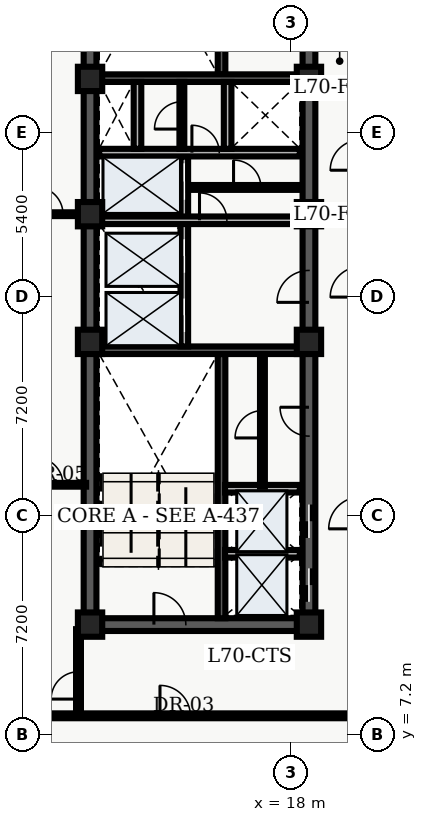
"""IFC4 building model, lengths in metres.
Left out: names, types, materials, properties, quantities, classifications, styles, units other than length and angle.
Written with IfcOpenShell. Run it as: python <this file> out.ifc"""

import sys

from ifc_helpers import new_model, entity, si_unit, converted_unit, direction, frame, origin_with_axes, origin_2d_with_axis, place, context, subcontext, project, spatial, polyline, rectangle, outline, extrude, element, fill, save


model = new_model("IFC4")
c1 = context("Model", 3, precision=1e-05, world=origin_with_axes(), true_north=direction((0.0, 1.0)))
c2 = subcontext(c1, "Body", "Model", "MODEL_VIEW")
j1 = project(units=[si_unit("LENGTHUNIT", "METRE"), converted_unit("PLANEANGLEUNIT", "DEGREE", entity("IfcPlaneAngleMeasure", 0.017), si_unit("PLANEANGLEUNIT", "RADIAN"), dimensions=[0, 0, 0, 0, 0, 0, 0])], contexts=[c1])
p1 = place(None, origin_with_axes())
s1 = spatial("IfcSite", under=j1, at=p1, CompositionType="ELEMENT")
p2 = place(p1, origin_with_axes())
s2 = spatial("IfcBuilding", under=s1, at=p2, CompositionType="ELEMENT")
p3 = place(p2, frame((0.0, 0.0, 284.1), z_axis=(0.0, 0.0, 1.0), x_axis=(1.0, 0.0, 0.0)))
s3 = spatial("IfcBuildingStorey", under=s2, at=p3, CompositionType="ELEMENT", Elevation=284.1)
p4 = place(p3, frame((11.4, 10.8, 0.0), z_axis=(0.0, 0.0, 1.0), x_axis=(0.0, 1.0, 0.0)))
e1 = element("IfcWall", 1, at=p4, inside=s3, PredefinedType="SHEAR", context=c2, shape_type="SweptSolid", body=[
    extrude(outline(polyline([(0.0, -0.21), (27.0, -0.21), (27.0, 0.21), (0.0, 0.21), (0.0, -0.21)])), origin_with_axes(), (0.0, 0.0, 1.0), 3.6),
])
p5 = place(p3, frame((11.4, 10.8, 0.0), z_axis=(0.0, 0.0, 1.0), x_axis=(1.0, 0.0, 0.0)))
e2 = element("IfcWall", 2, at=p5, inside=s3, PredefinedType="SHEAR", context=c2, shape_type="SweptSolid", body=[
    extrude(outline(polyline([(0.0, -0.21), (7.2, -0.21), (7.2, 0.21), (0.0, 0.21), (0.0, -0.21)])), origin_with_axes(), (0.0, 0.0, 1.0), 3.6),
])
p6 = place(p5, frame((2.625, 0.0, 0.0), z_axis=(0.0, 0.0, 1.0), x_axis=(1.0, 0.0, 0.0)))
e3 = element("IfcOpeningElement", 3, at=p6, cuts=e2, PredefinedType="OPENING", context=c2, shape_type="SweptSolid", body=[
    extrude(rectangle(XDim=1.05, YDim=0.44, at=origin_2d_with_axis()), origin_with_axes(), (0.0, 0.0, 1.0), 2.15),
])
p7 = place(p3, frame((18.6, 10.8, 0.0), z_axis=(0.0, 0.0, 1.0), x_axis=(0.0, 1.0, 0.0)))
e4 = element("IfcWall", 4, at=p7, inside=s3, PredefinedType="SHEAR", context=c2, shape_type="SweptSolid", body=[
    extrude(outline(polyline([(0.0, -0.21), (13.5, -0.21), (13.5, 0.21), (0.0, 0.21), (0.0, -0.21)])), origin_with_axes(), (0.0, 0.0, 1.0), 3.6),
])
p8 = place(p7, frame((1.3, 0.0, 0.0), z_axis=(0.0, 0.0, 1.0), x_axis=(1.0, 0.0, 0.0)))
e5 = element("IfcOpeningElement", 5, at=p8, cuts=e4, PredefinedType="OPENING", context=c2, shape_type="SweptSolid", body=[
    extrude(rectangle(XDim=1.1, YDim=0.44, at=origin_2d_with_axis()), origin_with_axes(), (0.0, 0.0, 1.0), 2.15),
])
p9 = place(p7, frame((3.4, 0.0, 0.0), z_axis=(0.0, 0.0, 1.0), x_axis=(1.0, 0.0, 0.0)))
e6 = element("IfcOpeningElement", 6, at=p9, cuts=e4, PredefinedType="OPENING", context=c2, shape_type="SweptSolid", body=[
    extrude(rectangle(XDim=1.1, YDim=0.44, at=origin_2d_with_axis()), origin_with_axes(), (0.0, 0.0, 1.0), 2.15),
])
p10 = place(p7, frame((11.125, 0.0, 0.0), z_axis=(0.0, 0.0, 1.0), x_axis=(1.0, 0.0, 0.0)))
e7 = element("IfcOpeningElement", 7, at=p10, cuts=e4, PredefinedType="OPENING", context=c2, shape_type="SweptSolid", body=[
    extrude(rectangle(XDim=1.05, YDim=0.44, at=origin_2d_with_axis()), origin_with_axes(), (0.0, 0.0, 1.0), 2.15),
])
p11 = place(p7, frame((6.675, 0.0, 0.0), z_axis=(0.0, 0.0, 1.0), x_axis=(1.0, 0.0, 0.0)))
e8 = element("IfcOpeningElement", 8, at=p11, cuts=e4, PredefinedType="OPENING", context=c2, shape_type="SweptSolid", body=[
    extrude(rectangle(XDim=0.95, YDim=0.44, at=origin_2d_with_axis()), origin_with_axes(), (0.0, 0.0, 1.0), 2.15),
])
p12 = place(p3, frame((18.6, 24.3, 0.0), z_axis=(0.0, 0.0, 1.0), x_axis=(0.0, 1.0, 0.0)))
e9 = element("IfcWall", 9, at=p12, inside=s3, PredefinedType="SHEAR", context=c2, shape_type="SweptSolid", body=[
    extrude(outline(polyline([(0.0, -0.21), (13.5, -0.21), (13.5, 0.21), (0.0, 0.21), (0.0, -0.21)])), origin_with_axes(), (0.0, 0.0, 1.0), 3.6),
])
p13 = place(p12, frame((6.725, 0.0, 0.0), z_axis=(0.0, 0.0, 1.0), x_axis=(1.0, 0.0, 0.0)))
e10 = element("IfcOpeningElement", 10, at=p13, cuts=e9, PredefinedType="OPENING", context=c2, shape_type="SweptSolid", body=[
    extrude(rectangle(XDim=1.05, YDim=0.44, at=origin_2d_with_axis()), origin_with_axes(), (0.0, 0.0, 1.0), 2.15),
])
p14 = place(p12, frame((11.125, 0.0, 0.0), z_axis=(0.0, 0.0, 1.0), x_axis=(1.0, 0.0, 0.0)))
e11 = element("IfcOpeningElement", 11, at=p14, cuts=e9, PredefinedType="OPENING", context=c2, shape_type="SweptSolid", body=[
    extrude(rectangle(XDim=1.05, YDim=0.44, at=origin_2d_with_axis()), origin_with_axes(), (0.0, 0.0, 1.0), 2.15),
])
p15 = place(p3, frame((15.725, 11.01, 0.0), z_axis=(0.0, 0.0, 1.0), x_axis=(0.0, 1.0, 0.0)))
e12 = element("IfcWall", 12, at=p15, inside=s3, PredefinedType="SHEAR", context=c2, shape_type="SweptSolid", body=[
    extrude(outline(polyline([(0.0, -0.125), (8.69, -0.125), (8.69, 0.125), (0.0, 0.125), (0.0, -0.125)])), origin_with_axes(), (0.0, 0.0, 1.0), 3.6),
])
p16 = place(p3, frame((11.61, 19.825, 0.0), z_axis=(0.0, 0.0, 1.0), x_axis=(1.0, 0.0, 0.0)))
e13 = element("IfcWall", 13, at=p16, inside=s3, PredefinedType="SHEAR", context=c2, shape_type="SweptSolid", body=[
    extrude(outline(polyline([(0.0, -0.125), (6.78, -0.125), (6.78, 0.125), (0.0, 0.125), (0.0, -0.125)])), origin_with_axes(), (0.0, 0.0, 1.0), 3.6),
])
p17 = place(p3, frame((15.725, 28.9, 0.0), z_axis=(0.0, 0.0, 1.0), x_axis=(0.0, 1.0, 0.0)))
e14 = element("IfcWall", 14, at=p17, inside=s3, PredefinedType="SHEAR", context=c2, shape_type="SweptSolid", body=[
    extrude(outline(polyline([(0.0, -0.125), (8.69, -0.125), (8.69, 0.125), (0.0, 0.125), (0.0, -0.125)])), origin_with_axes(), (0.0, 0.0, 1.0), 3.6),
])
p18 = place(p3, frame((11.61, 28.775, 0.0), z_axis=(0.0, 0.0, 1.0), x_axis=(1.0, 0.0, 0.0)))
e15 = element("IfcWall", 15, at=p18, inside=s3, PredefinedType="SHEAR", context=c2, shape_type="SweptSolid", body=[
    extrude(outline(polyline([(0.0, -0.125), (6.78, -0.125), (6.78, 0.125), (0.0, 0.125), (0.0, -0.125)])), origin_with_axes(), (0.0, 0.0, 1.0), 3.6),
])
p19 = place(p3, frame((14.5, 19.95, 0.0), z_axis=(0.0, 0.0, 1.0), x_axis=(0.0, 1.0, 0.0)))
e16 = element("IfcWall", 16, at=p19, inside=s3, PredefinedType="SOLIDWALL", context=c2, shape_type="SweptSolid", body=[
    extrude(outline(polyline([(0.0, -0.125), (6.25, -0.125), (6.25, 0.125), (0.0, 0.125), (0.0, -0.125)])), origin_with_axes(), (0.0, 0.0, 1.0), 2.64),
])
p20 = place(p19, frame((1.025, 0.0, 0.0), z_axis=(0.0, 0.0, 1.0), x_axis=(1.0, 0.0, 0.0)))
e17 = element("IfcOpeningElement", 17, at=p20, cuts=e16, PredefinedType="OPENING", context=c2, shape_type="SweptSolid", body=[
    extrude(rectangle(XDim=1.1, YDim=0.27, at=origin_2d_with_axis()), origin_with_axes(), (0.0, 0.0, 1.0), 2.15),
])
p21 = place(p19, frame((2.975, 0.0, 0.0), z_axis=(0.0, 0.0, 1.0), x_axis=(1.0, 0.0, 0.0)))
e18 = element("IfcOpeningElement", 18, at=p21, cuts=e16, PredefinedType="OPENING", context=c2, shape_type="SweptSolid", body=[
    extrude(rectangle(XDim=1.1, YDim=0.27, at=origin_2d_with_axis()), origin_with_axes(), (0.0, 0.0, 1.0), 2.15),
])
p22 = place(p19, frame((5.425, 0.0, 0.0), z_axis=(0.0, 0.0, 1.0), x_axis=(1.0, 0.0, 0.0)))
e19 = element("IfcOpeningElement", 19, at=p22, cuts=e16, PredefinedType="OPENING", context=c2, shape_type="SweptSolid", body=[
    extrude(rectangle(XDim=1.2, YDim=0.27, at=origin_2d_with_axis()), origin_with_axes(), (0.0, 0.0, 1.0), 2.15),
])
p23 = place(p3, frame((11.7, 24.1, 0.0), z_axis=(0.0, 0.0, 1.0), x_axis=(1.0, 0.0, 0.0)))
e20 = element("IfcWall", 20, at=p23, inside=s3, PredefinedType="SOLIDWALL", context=c2, shape_type="SweptSolid", body=[
    extrude(outline(polyline([(0.0, -0.125), (6.6, -0.125), (6.6, 0.125), (0.0, 0.125), (0.0, -0.125)])), origin_with_axes(), (0.0, 0.0, 1.0), 2.64),
])
p24 = place(p23, frame((3.75, 0.0, 0.0), z_axis=(0.0, 0.0, 1.0), x_axis=(1.0, 0.0, 0.0)))
e21 = element("IfcOpeningElement", 21, at=p24, cuts=e20, PredefinedType="OPENING", context=c2, shape_type="SweptSolid", body=[
    extrude(rectangle(XDim=0.9, YDim=0.27, at=origin_2d_with_axis()), origin_with_axes(), (0.0, 0.0, 1.0), 2.15),
])
p25 = place(p3, frame((11.7, 26.325, 0.0), z_axis=(0.0, 0.0, 1.0), x_axis=(1.0, 0.0, 0.0)))
e22 = element("IfcWall", 22, at=p25, inside=s3, PredefinedType="SOLIDWALL", context=c2, shape_type="SweptSolid", body=[
    extrude(outline(polyline([(0.0, -0.125), (6.6, -0.125), (6.6, 0.125), (0.0, 0.125), (0.0, -0.125)])), origin_with_axes(), (0.0, 0.0, 1.0), 2.64),
])
p26 = place(p25, frame((3.5, 0.0, 0.0), z_axis=(0.0, 0.0, 1.0), x_axis=(1.0, 0.0, 0.0)))
e23 = element("IfcOpeningElement", 23, at=p26, cuts=e22, PredefinedType="OPENING", context=c2, shape_type="SweptSolid", body=[
    extrude(rectangle(XDim=0.9, YDim=0.27, at=origin_2d_with_axis()), origin_with_axes(), (0.0, 0.0, 1.0), 2.15),
])
for number, where, z_axis, x_axis in (
    (24, (12.96, 26.45, 0.0), (0.0, 0.0, 1.0), (0.0, 1.0, 0.0)),
    (25, (15.925, 26.45, 0.0), (0.0, 0.0, 1.0), (0.0, 1.0, 0.0)),
):
    element("IfcWall", number, at=place(p3, frame(where, z_axis=z_axis, x_axis=x_axis)), inside=s3, PredefinedType="SOLIDWALL", context=c2, shape_type="SweptSolid", body=[
        extrude(outline(polyline([(0.0, -0.125), (2.2, -0.125), (2.2, 0.125), (0.0, 0.125), (0.0, -0.125)])), origin_with_axes(), (0.0, 0.0, 1.0), 2.64),
    ])
for number, where, z_axis, x_axis in (
    (26, (11.4, 10.8, 0.0), (0.0, 0.0, 1.0), (1.0, 0.0, 0.0)),
    (27, (11.4, 20.1, 0.0), (0.0, 0.0, 1.0), (1.0, 0.0, 0.0)),
    (28, (11.4, 24.3, 0.0), (0.0, 0.0, 1.0), (1.0, 0.0, 0.0)),
    (29, (11.4, 28.75, 0.0), (0.0, 0.0, 1.0), (1.0, 0.0, 0.0)),
    (30, (18.6, 10.8, 0.0), (0.0, 0.0, 1.0), (1.0, 0.0, 0.0)),
    (31, (18.6, 20.1, 0.0), (0.0, 0.0, 1.0), (1.0, 0.0, 0.0)),
    (32, (18.6, 24.3, 0.0), (0.0, 0.0, 1.0), (1.0, 0.0, 0.0)),
    (33, (18.6, 28.75, 0.0), (0.0, 0.0, 1.0), (1.0, 0.0, 0.0)),
):
    element("IfcColumn", number, at=place(p3, frame(where, z_axis=z_axis, x_axis=x_axis)), inside=s3, PredefinedType="COLUMN", context=c2, shape_type="SweptSolid", body=[
        extrude(rectangle(XDim=0.8, YDim=0.8, at=origin_2d_with_axis()), origin_with_axes(), (0.0, 0.0, 1.0), 3.9),
    ])
p27 = place(p3, frame((14.62, 25.18, 0.0), z_axis=(0.0, 0.0, 1.0), x_axis=(1.0, 0.0, 0.0)))
e34 = element("IfcWall", 34, at=p27, inside=s3, PredefinedType="PARTITIONING", context=c2, shape_type="SweptSolid", body=[
    extrude(outline(polyline([(0.0, -0.08), (3.68, -0.08), (3.68, 0.08), (0.0, 0.08), (0.0, -0.08)])), origin_with_axes(), (0.0, 0.0, 1.0), 2.64),
])
p28 = place(p27, frame((1.95, 0.0, 0.0), z_axis=(0.0, 0.0, 1.0), x_axis=(1.0, 0.0, 0.0)))
e35 = element("IfcOpeningElement", 35, at=p28, cuts=e34, PredefinedType="OPENING", context=c2, shape_type="SweptSolid", body=[
    extrude(rectangle(XDim=0.9, YDim=0.18, at=origin_2d_with_axis()), origin_with_axes(), (0.0, 0.0, 1.0), 2.15),
])
p29 = place(p3, frame((14.42, 26.45, 0.0), z_axis=(0.0, 0.0, 1.0), x_axis=(0.0, 1.0, 0.0)))
e36 = element("IfcWall", 36, at=p29, inside=s3, PredefinedType="PARTITIONING", context=c2, shape_type="SweptSolid", body=[
    extrude(outline(polyline([(0.0, -0.08), (2.2, -0.08), (2.2, 0.08), (0.0, 0.08), (0.0, -0.08)])), origin_with_axes(), (0.0, 0.0, 1.0), 2.64),
])
p30 = place(p29, frame((1.1, 0.0, 0.0), z_axis=(0.0, 0.0, 1.0), x_axis=(1.0, 0.0, 0.0)))
e37 = element("IfcOpeningElement", 37, at=p30, cuts=e36, PredefinedType="OPENING", context=c2, shape_type="SweptSolid", body=[
    extrude(rectangle(XDim=0.9, YDim=0.18, at=origin_2d_with_axis()), origin_with_axes(), (0.0, 0.0, 1.0), 2.15),
])
for number, where, z_axis, x_axis in (
    (38, (15.84, 13.13, 0.0), (0.0, 0.0, 1.0), (1.0, 0.0, 0.0)),
    (39, (15.84, 15.27, 0.0), (0.0, 0.0, 1.0), (1.0, 0.0, 0.0)),
):
    element("IfcWall", number, at=place(p3, frame(where, z_axis=z_axis, x_axis=x_axis)), inside=s3, PredefinedType="SOLIDWALL", context=c2, shape_type="SweptSolid", body=[
        extrude(outline(polyline([(0.0, -0.125), (2.46, -0.125), (2.46, 0.125), (0.0, 0.125), (0.0, -0.125)])), origin_with_axes(), (0.0, 0.0, 1.0), 2.64),
    ])
p31 = place(p3, frame((17.07, 15.34, 0.0), z_axis=(0.0, 0.0, 1.0), x_axis=(0.0, 1.0, 0.0)))
e40 = element("IfcWall", 40, at=p31, inside=s3, PredefinedType="PARTITIONING", context=c2, shape_type="SweptSolid", body=[
    extrude(outline(polyline([(0.0, -0.08), (4.36, -0.08), (4.36, 0.08), (0.0, 0.08), (0.0, -0.08)])), origin_with_axes(), (0.0, 0.0, 1.0), 2.64),
])
p32 = place(p31, frame((2.05, 0.0, 0.0), z_axis=(0.0, 0.0, 1.0), x_axis=(1.0, 0.0, 0.0)))
e41 = element("IfcOpeningElement", 41, at=p32, cuts=e40, PredefinedType="OPENING", context=c2, shape_type="SweptSolid", body=[
    extrude(rectangle(XDim=0.9, YDim=0.18, at=origin_2d_with_axis()), origin_with_axes(), (0.0, 0.0, 1.0), 2.15),
])
p33 = place(p3, frame((8.135, 7.8, 0.0), z_axis=(0.0, 0.0, 1.0), x_axis=(1.0, 0.0, 0.0)))
e42 = element("IfcWall", 42, at=p33, inside=s3, PredefinedType="PARTITIONING", context=c2, shape_type="SweptSolid", body=[
    extrude(outline(polyline([(0.0, -0.08), (12.165, -0.08), (12.165, 0.08), (0.0, 0.08), (0.0, -0.08)])), origin_with_axes(), (0.0, 0.0, 1.0), 2.64),
])
p34 = place(p33, frame((6.065, 0.0, 0.0), z_axis=(0.0, 0.0, 1.0), x_axis=(1.0, 0.0, 0.0)))
e43 = element("IfcOpeningElement", 43, at=p34, cuts=e42, PredefinedType="OPENING", context=c2, shape_type="SweptSolid", body=[
    extrude(rectangle(XDim=1.0, YDim=0.18, at=origin_2d_with_axis()), origin_with_axes(), (0.0, 0.0, 1.0), 2.15),
])
p35 = place(p3, frame((11.02, 7.8, 0.0), z_axis=(0.0, 0.0, 1.0), x_axis=(0.0, 1.0, 0.0)))
e44 = element("IfcWall", 44, at=p35, inside=s3, PredefinedType="PARTITIONING", context=c2, shape_type="SweptSolid", body=[
    extrude(outline(polyline([(0.0, -0.08), (2.85, -0.08), (2.85, 0.08), (0.0, 0.08), (0.0, -0.08)])), origin_with_axes(), (0.0, 0.0, 1.0), 2.64),
])
p36 = place(p35, frame((1.0, 0.0, 0.0), z_axis=(0.0, 0.0, 1.0), x_axis=(1.0, 0.0, 0.0)))
e45 = element("IfcOpeningElement", 45, at=p36, cuts=e44, PredefinedType="OPENING", context=c2, shape_type="SweptSolid", body=[
    extrude(rectangle(XDim=0.9, YDim=0.18, at=origin_2d_with_axis()), origin_with_axes(), (0.0, 0.0, 1.0), 2.15),
])
p37 = place(p3, frame((8.135, 15.4, 0.0), z_axis=(0.0, 0.0, 1.0), x_axis=(1.0, 0.0, 0.0)))
e46 = element("IfcWall", 46, at=p37, inside=s3, PredefinedType="PARTITIONING", context=c2, shape_type="SweptSolid", body=[
    extrude(outline(polyline([(0.0, -0.062), (3.135, -0.062), (3.135, 0.062), (0.0, 0.062), (0.0, -0.062)])), origin_with_axes(), (0.0, 0.0, 1.0), 2.64),
])
p38 = place(p37, frame((1.925, 0.0, 0.0), z_axis=(0.0, 0.0, 1.0), x_axis=(1.0, 0.0, 0.0)))
e47 = element("IfcOpeningElement", 47, at=p38, cuts=e46, PredefinedType="OPENING", context=c2, shape_type="SweptSolid", body=[
    extrude(rectangle(XDim=0.9, YDim=0.145, at=origin_2d_with_axis()), origin_with_axes(), (0.0, 0.0, 1.0), 2.15),
])
p39 = place(p3, frame((8.135, 24.3, 0.0), z_axis=(0.0, 0.0, 1.0), x_axis=(1.0, 0.0, 0.0)))
e48 = element("IfcWall", 48, at=p39, inside=s3, PredefinedType="PARTITIONING", context=c2, shape_type="SweptSolid", body=[
    extrude(outline(polyline([(0.0, -0.062), (3.135, -0.062), (3.135, 0.062), (0.0, 0.062), (0.0, -0.062)])), origin_with_axes(), (0.0, 0.0, 1.0), 2.64),
])
p40 = place(p39, frame((1.925, 0.0, 0.0), z_axis=(0.0, 0.0, 1.0), x_axis=(1.0, 0.0, 0.0)))
e49 = element("IfcOpeningElement", 49, at=p40, cuts=e48, PredefinedType="OPENING", context=c2, shape_type="SweptSolid", body=[
    extrude(rectangle(XDim=0.9, YDim=0.145, at=origin_2d_with_axis()), origin_with_axes(), (0.0, 0.0, 1.0), 2.15),
])
p41 = place(p7, frame((1.3, 0.0, 0.0), z_axis=(0.0, 0.0, 1.0), x_axis=(1.0, 0.0, 0.0)))
e50 = element("IfcDoor", 50, at=p41, inside=s3, OperationType="SLIDING_TO_LEFT", PredefinedType="DOOR", context=c2, shape_type="SweptSolid", body=[
    extrude(rectangle(XDim=1.1, YDim=0.09, at=origin_2d_with_axis()), origin_with_axes(), (0.0, 0.0, 1.0), 2.15),
])
fill(e5, e50)
p42 = place(p7, frame((3.4, 0.0, 0.0), z_axis=(0.0, 0.0, 1.0), x_axis=(1.0, 0.0, 0.0)))
e51 = element("IfcDoor", 51, at=p42, inside=s3, OperationType="SLIDING_TO_RIGHT", PredefinedType="DOOR", context=c2, shape_type="SweptSolid", body=[
    extrude(rectangle(XDim=1.1, YDim=0.09, at=origin_2d_with_axis()), origin_with_axes(), (0.0, 0.0, 1.0), 2.15),
])
fill(e6, e51)
p43 = place(p19, frame((1.025, 0.0, 0.0), z_axis=(0.0, 0.0, 1.0), x_axis=(1.0, 0.0, 0.0)))
e52 = element("IfcDoor", 52, at=p43, inside=s3, OperationType="SLIDING_TO_LEFT", PredefinedType="DOOR", context=c2, shape_type="SweptSolid", body=[
    extrude(rectangle(XDim=1.1, YDim=0.09, at=origin_2d_with_axis()), origin_with_axes(), (0.0, 0.0, 1.0), 2.15),
])
fill(e17, e52)
p44 = place(p19, frame((2.975, 0.0, 0.0), z_axis=(0.0, 0.0, 1.0), x_axis=(1.0, 0.0, 0.0)))
e53 = element("IfcDoor", 53, at=p44, inside=s3, OperationType="SLIDING_TO_RIGHT", PredefinedType="DOOR", context=c2, shape_type="SweptSolid", body=[
    extrude(rectangle(XDim=1.1, YDim=0.09, at=origin_2d_with_axis()), origin_with_axes(), (0.0, 0.0, 1.0), 2.15),
])
fill(e18, e53)
p45 = place(p19, frame((5.425, 0.0, 0.0), z_axis=(0.0, 0.0, 1.0), x_axis=(1.0, 0.0, 0.0)))
e54 = element("IfcDoor", 54, at=p45, inside=s3, OperationType="DOUBLE_DOOR_SLIDING", PredefinedType="DOOR", context=c2, shape_type="SweptSolid", body=[
    extrude(rectangle(XDim=1.2, YDim=0.09, at=origin_2d_with_axis()), origin_with_axes(), (0.0, 0.0, 1.0), 2.15),
])
fill(e19, e54)
p46 = place(p5, frame((2.625, 0.0, 0.0), z_axis=(0.0, 0.0, 1.0), x_axis=(1.0, 0.0, 0.0)))
e55 = element("IfcDoor", 55, at=p46, inside=s3, OperationType="SINGLE_SWING_LEFT", PredefinedType="DOOR", context=c2, shape_type="SweptSolid", body=[
    extrude(rectangle(XDim=1.05, YDim=0.09, at=origin_2d_with_axis()), origin_with_axes(), (0.0, 0.0, 1.0), 2.15),
])
fill(e3, e55)
p47 = place(p7, frame((11.125, 0.0, 0.0), z_axis=(0.0, 0.0, 1.0), x_axis=(1.0, 0.0, 0.0)))
e56 = element("IfcDoor", 56, at=p47, inside=s3, OperationType="SINGLE_SWING_LEFT", PredefinedType="DOOR", context=c2, shape_type="SweptSolid", body=[
    extrude(rectangle(XDim=1.05, YDim=0.09, at=origin_2d_with_axis()), origin_with_axes(), (0.0, 0.0, 1.0), 2.15),
])
fill(e7, e56)
p48 = place(p25, frame((3.5, 0.0, 0.0), z_axis=(0.0, 0.0, 1.0), x_axis=(1.0, 0.0, 0.0)))
e57 = element("IfcDoor", 57, at=p48, inside=s3, OperationType="SINGLE_SWING_LEFT", PredefinedType="DOOR", context=c2, shape_type="SweptSolid", body=[
    extrude(rectangle(XDim=0.9, YDim=0.09, at=origin_2d_with_axis()), origin_with_axes(), (0.0, 0.0, 1.0), 2.15),
])
fill(e23, e57)
p49 = place(p29, frame((1.1, 0.0, 0.0), z_axis=(0.0, 0.0, 1.0), x_axis=(1.0, 0.0, 0.0)))
e58 = element("IfcDoor", 58, at=p49, inside=s3, OperationType="SINGLE_SWING_LEFT", PredefinedType="DOOR", context=c2, shape_type="SweptSolid", body=[
    extrude(rectangle(XDim=0.9, YDim=0.09, at=origin_2d_with_axis()), origin_with_axes(), (0.0, 0.0, 1.0), 2.15),
])
fill(e37, e58)
p50 = place(p23, frame((3.75, 0.0, 0.0), z_axis=(0.0, 0.0, 1.0), x_axis=(1.0, 0.0, 0.0)))
e59 = element("IfcDoor", 59, at=p50, inside=s3, OperationType="SINGLE_SWING_LEFT", PredefinedType="DOOR", context=c2, shape_type="SweptSolid", body=[
    extrude(rectangle(XDim=0.9, YDim=0.09, at=origin_2d_with_axis()), origin_with_axes(), (0.0, 0.0, 1.0), 2.15),
])
fill(e21, e59)
p51 = place(p27, frame((1.95, 0.0, 0.0), z_axis=(0.0, 0.0, 1.0), x_axis=(1.0, 0.0, 0.0)))
e60 = element("IfcDoor", 60, at=p51, inside=s3, OperationType="SINGLE_SWING_LEFT", PredefinedType="DOOR", context=c2, shape_type="SweptSolid", body=[
    extrude(rectangle(XDim=0.9, YDim=0.09, at=origin_2d_with_axis()), origin_with_axes(), (0.0, 0.0, 1.0), 2.15),
])
fill(e35, e60)
p52 = place(p31, frame((2.05, 0.0, 0.0), z_axis=(0.0, 0.0, 1.0), x_axis=(1.0, 0.0, 0.0)))
e61 = element("IfcDoor", 61, at=p52, inside=s3, OperationType="SINGLE_SWING_LEFT", PredefinedType="DOOR", context=c2, shape_type="SweptSolid", body=[
    extrude(rectangle(XDim=0.9, YDim=0.09, at=origin_2d_with_axis()), origin_with_axes(), (0.0, 0.0, 1.0), 2.15),
])
fill(e41, e61)
p53 = place(p7, frame((6.675, 0.0, 0.0), z_axis=(0.0, 0.0, 1.0), x_axis=(1.0, 0.0, 0.0)))
e62 = element("IfcDoor", 62, at=p53, inside=s3, OperationType="SINGLE_SWING_RIGHT", PredefinedType="DOOR", context=c2, shape_type="SweptSolid", body=[
    extrude(rectangle(XDim=0.95, YDim=0.09, at=origin_2d_with_axis()), origin_with_axes(), (0.0, 0.0, 1.0), 2.15),
])
fill(e8, e62)
p54 = place(p37, frame((1.925, 0.0, 0.0), z_axis=(0.0, 0.0, 1.0), x_axis=(1.0, 0.0, 0.0)))
e63 = element("IfcDoor", 63, at=p54, inside=s3, OperationType="SINGLE_SWING_LEFT", PredefinedType="DOOR", context=c2, shape_type="SweptSolid", body=[
    extrude(rectangle(XDim=0.9, YDim=0.075, at=origin_2d_with_axis()), origin_with_axes(), (0.0, 0.0, 1.0), 2.15),
])
fill(e47, e63)
p55 = place(p39, frame((1.925, 0.0, 0.0), z_axis=(0.0, 0.0, 1.0), x_axis=(1.0, 0.0, 0.0)))
e64 = element("IfcDoor", 64, at=p55, inside=s3, OperationType="SINGLE_SWING_LEFT", PredefinedType="DOOR", context=c2, shape_type="SweptSolid", body=[
    extrude(rectangle(XDim=0.9, YDim=0.075, at=origin_2d_with_axis()), origin_with_axes(), (0.0, 0.0, 1.0), 2.15),
])
fill(e49, e64)
p56 = place(p35, frame((1.0, 0.0, 0.0), z_axis=(0.0, 0.0, 1.0), x_axis=(1.0, 0.0, 0.0)))
e65 = element("IfcDoor", 65, at=p56, inside=s3, OperationType="SINGLE_SWING_LEFT", PredefinedType="DOOR", context=c2, shape_type="SweptSolid", body=[
    extrude(rectangle(XDim=0.9, YDim=0.09, at=origin_2d_with_axis()), origin_with_axes(), (0.0, 0.0, 1.0), 2.15),
])
fill(e45, e65)
p57 = place(p33, frame((6.065, 0.0, 0.0), z_axis=(0.0, 0.0, 1.0), x_axis=(1.0, 0.0, 0.0)))
e66 = element("IfcDoor", 66, at=p57, inside=s3, OperationType="SINGLE_SWING_LEFT", PredefinedType="DOOR", context=c2, shape_type="SweptSolid", body=[
    extrude(rectangle(XDim=1.0, YDim=0.09, at=origin_2d_with_axis()), origin_with_axes(), (0.0, 0.0, 1.0), 2.15),
])
fill(e43, e66)
save(model, sys.argv[1])
